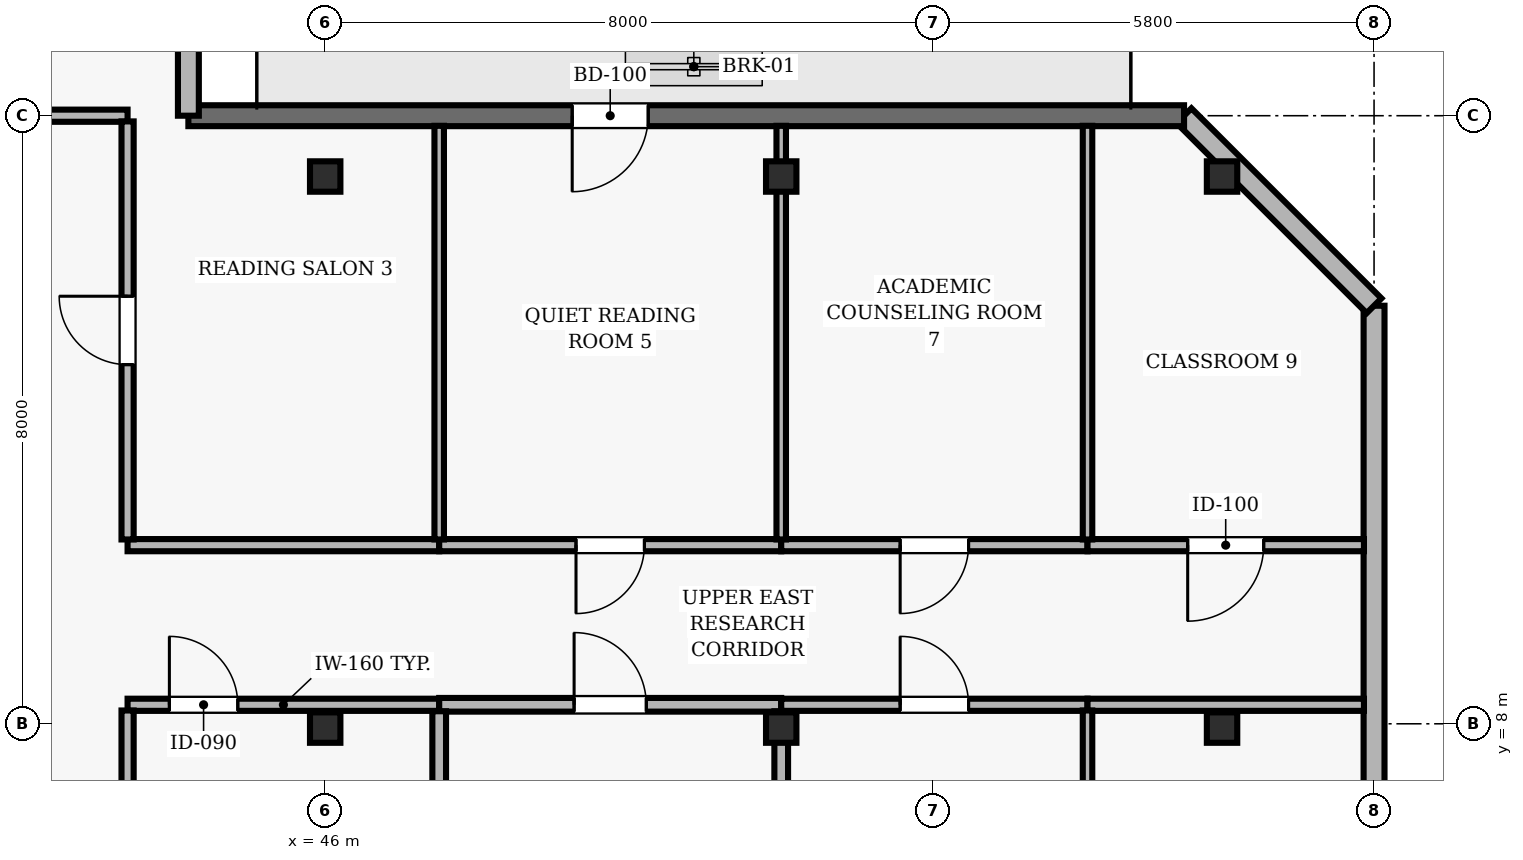
"""IFC4 building model, lengths in metres.
Left out: names, types, materials, properties, quantities, classifications, styles, units other than length and angle.
Written with IfcOpenShell. Run it as: python <this file> out.ifc"""

import sys

from ifc_helpers import new_model, si_unit, direction, frame, frame_2d, origin, origin_2d, place, context, subcontext, project, spatial, rectangle, hollow_rectangle, extrude, element, fill, save


model = new_model("IFC4")
c1 = context("Model", 3, precision=1e-05, world=origin(), true_north=direction((0.0, 1.0)))
c2 = subcontext(c1, "Body", "Model", "MODEL_VIEW")
j1 = project(units=[si_unit("LENGTHUNIT", "METRE"), si_unit("PLANEANGLEUNIT", "RADIAN")], contexts=[c1])
p1 = place(None, origin())
s1 = spatial("IfcSite", under=j1, at=p1, CompositionType="ELEMENT")
p2 = place(p1, origin())
s2 = spatial("IfcBuilding", under=s1, at=p2, CompositionType="ELEMENT")
p3 = place(p2, frame((0.0, 0.0, 275.5)))
s3 = spatial("IfcBuildingStorey", under=s2, at=p3, CompositionType="ELEMENT", Elevation=275.5)
for number, where, z_axis, x_axis in (
    (1, (46.0, 7.95, 0.0), (0.0, 0.0, 1.0), (1.0, 0.0, 0.0)),
    (2, (46.0, 15.2, 0.0), (0.0, 0.0, 1.0), (1.0, 0.0, 0.0)),
    (3, (52.0, 7.95, 0.0), (0.0, 0.0, 1.0), (1.0, 0.0, 0.0)),
    (4, (52.0, 15.2, 0.0), (0.0, 0.0, 1.0), (1.0, 0.0, 0.0)),
    (5, (57.8, 7.95, 0.0), (0.0, 0.0, 1.0), (1.0, 0.0, 0.0)),
    (6, (57.8, 15.2, 0.0), (0.0, 0.0, 1.0), (1.0, 0.0, 0.0)),
):
    element("IfcColumn", number, at=place(p3, frame(where, z_axis=z_axis, x_axis=x_axis)), inside=s3, PredefinedType="COLUMN", context=c2, shape_type="SweptSolid", body=[
        extrude(hollow_rectangle(XDim=0.4, YDim=0.4, WallThickness=0.02, at=origin_2d()), origin(), (0.0, 0.0, 1.0), 3.9),
    ])
p4 = place(p3, frame((59.8, 2.5, 0.0), z_axis=(0.0, 0.0, 1.0), x_axis=(0.0, 1.0, 0.0)))
e7 = element("IfcWall", 7, at=p4, inside=s3, PredefinedType="SOLIDWALL", context=c2, shape_type="SweptSolid", body=[
    extrude(rectangle(XDim=11.0, YDim=0.275, at=frame_2d((5.5, 0.0))), origin(), (0.0, 0.0, 1.0), 3.69),
])
p5 = place(p4, frame((1.85, 0.0, 0.9)))
e8 = element("IfcOpeningElement", 8, at=p5, cuts=e7, PredefinedType="OPENING", context=c2, shape_type="SweptSolid", body=[
    extrude(rectangle(XDim=1.8, YDim=2.2, at=frame_2d((0.9, 1.1))), frame((0.0, 0.147, 0.0), z_axis=(0.0, -1.0, 0.0), x_axis=(1.0, 0.0, 0.0)), (0.0, 0.0, 1.0), 0.295),
])
p6 = place(p3, frame((59.8, 13.5, 0.0), z_axis=(0.0, 0.0, 1.0), x_axis=(-0.707106781187, 0.707106781187, 0.0)))
e9 = element("IfcWall", 9, at=p6, inside=s3, PredefinedType="SOLIDWALL", context=c2, shape_type="SweptSolid", body=[
    extrude(rectangle(XDim=3.536, YDim=0.275, at=frame_2d((1.768, 0.0))), origin(), (0.0, 0.0, 1.0), 3.69),
])
p7 = place(p3, frame((57.3, 16.0, 0.0), z_axis=(0.0, 0.0, 1.0), x_axis=(-1.0, 0.0, 0.0)))
e10 = element("IfcWall", 10, at=p7, inside=s3, PredefinedType="SOLIDWALL", context=c2, shape_type="SweptSolid", body=[
    extrude(rectangle(XDim=13.1, YDim=0.275, at=frame_2d((6.55, 0.0))), origin(), (0.0, 0.0, 1.0), 3.69),
])
p8 = place(p7, frame((7.05, 0.0, 0.0)))
e11 = element("IfcOpeningElement", 11, at=p8, cuts=e10, PredefinedType="OPENING", context=c2, shape_type="SweptSolid", body=[
    extrude(rectangle(XDim=1.0, YDim=2.2, at=frame_2d((0.5, 1.1))), frame((0.0, 0.147, 0.0), z_axis=(0.0, -1.0, 0.0), x_axis=(1.0, 0.0, 0.0)), (0.0, 0.0, 1.0), 0.295),
])
p9 = place(p3, frame((44.2, 16.0, 0.0), z_axis=(0.0, 0.0, 1.0), x_axis=(0.0, 1.0, 0.0)))
e12 = element("IfcWall", 12, at=p9, inside=s3, PredefinedType="SOLIDWALL", context=c2, shape_type="SweptSolid", body=[
    extrude(rectangle(XDim=5.4, YDim=0.275, at=frame_2d((2.7, 0.0))), origin(), (0.0, 0.0, 1.0), 3.69),
])
p10 = place(p9, frame((2.1, 0.0, 0.9)))
e13 = element("IfcOpeningElement", 13, at=p10, cuts=e12, PredefinedType="OPENING", context=c2, shape_type="SweptSolid", body=[
    extrude(rectangle(XDim=1.2, YDim=1.6, at=frame_2d((0.6, 0.8))), frame((0.0, 0.147, 0.0), z_axis=(0.0, -1.0, 0.0), x_axis=(1.0, 0.0, 0.0)), (0.0, 0.0, 1.0), 0.295),
])
p11 = place(p3, frame((43.4, 8.25, 0.0), z_axis=(0.0, 0.0, 1.0), x_axis=(1.0, 0.0, 0.0)))
e14 = element("IfcWall", 14, at=p11, inside=s3, PredefinedType="PARTITIONING", context=c2, shape_type="SweptSolid", body=[
    extrude(rectangle(XDim=4.1, YDim=0.16, at=frame_2d((2.05, 0.0))), origin(), (0.0, 0.0, 1.0), 3.227),
])
p12 = place(p11, frame((0.55, 0.0, 0.0)))
e15 = element("IfcOpeningElement", 15, at=p12, cuts=e14, PredefinedType="OPENING", context=c2, shape_type="SweptSolid", body=[
    extrude(rectangle(XDim=0.9, YDim=2.1, at=frame_2d((0.45, 1.05))), frame((0.0, 0.09, 0.0), z_axis=(0.0, -1.0, 0.0), x_axis=(1.0, 0.0, 0.0)), (0.0, 0.0, 1.0), 0.18),
])
p13 = place(p3, frame((43.4, 16.0, 0.0), z_axis=(0.0, 0.0, 1.0), x_axis=(-1.0, 0.0, 0.0)))
e16 = element("IfcWall", 16, at=p13, inside=s3, PredefinedType="PARTITIONING", context=c2, shape_type="SweptSolid", body=[
    extrude(rectangle(XDim=5.35, YDim=0.16, at=frame_2d((2.675, 0.0))), origin(), (0.0, 0.0, 1.0), 3.39),
])
p14 = place(p13, frame((2.225, 0.0, 0.0)))
e17 = element("IfcOpeningElement", 17, at=p14, cuts=e16, PredefinedType="OPENING", context=c2, shape_type="SweptSolid", body=[
    extrude(rectangle(XDim=0.9, YDim=2.1, at=frame_2d((0.45, 1.05))), frame((0.0, 0.09, 0.0), z_axis=(0.0, -1.0, 0.0), x_axis=(1.0, 0.0, 0.0)), (0.0, 0.0, 1.0), 0.18),
])
p15 = place(p3, frame((47.5, 8.25, 0.0), z_axis=(0.0, 0.0, 1.0), x_axis=(1.0, 0.0, 0.0)))
e18 = element("IfcWall", 18, at=p15, inside=s3, PredefinedType="PARTITIONING", context=c2, shape_type="SweptSolid", body=[
    extrude(rectangle(XDim=4.5, YDim=0.18, at=frame_2d((2.25, 0.0))), origin(), (0.0, 0.0, 1.0), 3.227),
])
p16 = place(p15, frame((1.775, 0.0, 0.0)))
e19 = element("IfcOpeningElement", 19, at=p16, cuts=e18, PredefinedType="OPENING", context=c2, shape_type="SweptSolid", body=[
    extrude(rectangle(XDim=0.95, YDim=2.1, at=frame_2d((0.475, 1.05))), frame((0.0, 0.1, 0.0), z_axis=(0.0, -1.0, 0.0), x_axis=(1.0, 0.0, 0.0)), (0.0, 0.0, 1.0), 0.2),
])
p17 = place(p3, frame((47.5, 10.35, 0.0), z_axis=(0.0, 0.0, 1.0), x_axis=(-1.0, 0.0, 0.0)))
e20 = element("IfcWall", 20, at=p17, inside=s3, PredefinedType="PARTITIONING", context=c2, shape_type="SweptSolid", body=[
    extrude(rectangle(XDim=4.1, YDim=0.16, at=frame_2d((2.05, 0.0))), origin(), (0.0, 0.0, 1.0), 3.424),
])
p18 = place(p3, frame((52.0, 8.25, 0.0), z_axis=(0.0, 0.0, 1.0), x_axis=(1.0, 0.0, 0.0)))
e21 = element("IfcWall", 21, at=p18, inside=s3, PredefinedType="PARTITIONING", context=c2, shape_type="SweptSolid", body=[
    extrude(rectangle(XDim=4.03, YDim=0.16, at=frame_2d((2.015, 0.0))), origin(), (0.0, 0.0, 1.0), 3.227),
])
p19 = place(p18, frame((1.565, 0.0, 0.0)))
e22 = element("IfcOpeningElement", 22, at=p19, cuts=e21, PredefinedType="OPENING", context=c2, shape_type="SweptSolid", body=[
    extrude(rectangle(XDim=0.9, YDim=2.1, at=frame_2d((0.45, 1.05))), frame((0.0, 0.09, 0.0), z_axis=(0.0, -1.0, 0.0), x_axis=(1.0, 0.0, 0.0)), (0.0, 0.0, 1.0), 0.18),
])
p20 = place(p3, frame((52.0, 10.35, 0.0), z_axis=(0.0, 0.0, 1.0), x_axis=(-1.0, 0.0, 0.0)))
e23 = element("IfcWall", 23, at=p20, inside=s3, PredefinedType="PARTITIONING", context=c2, shape_type="SweptSolid", body=[
    extrude(rectangle(XDim=4.5, YDim=0.16, at=frame_2d((2.25, 0.0))), origin(), (0.0, 0.0, 1.0), 3.424),
])
p21 = place(p20, frame((1.8, 0.0, 0.0)))
e24 = element("IfcOpeningElement", 24, at=p21, cuts=e23, PredefinedType="OPENING", context=c2, shape_type="SweptSolid", body=[
    extrude(rectangle(XDim=0.9, YDim=2.1, at=frame_2d((0.45, 1.05))), frame((0.0, 0.09, 0.0), z_axis=(0.0, -1.0, 0.0), x_axis=(1.0, 0.0, 0.0)), (0.0, 0.0, 1.0), 0.18),
])
p22 = place(p3, frame((56.03, 8.25, 0.0), z_axis=(0.0, 0.0, 1.0), x_axis=(1.0, 0.0, 0.0)))
e25 = element("IfcWall", 25, at=p22, inside=s3, PredefinedType="PARTITIONING", context=c2, shape_type="SweptSolid", body=[
    extrude(rectangle(XDim=3.637, YDim=0.16, at=frame_2d((1.818, 0.0))), origin(), (0.0, 0.0, 1.0), 3.227),
])
p23 = place(p3, frame((56.03, 10.35, 0.0), z_axis=(0.0, 0.0, 1.0), x_axis=(-1.0, 0.0, 0.0)))
e26 = element("IfcWall", 26, at=p23, inside=s3, PredefinedType="PARTITIONING", context=c2, shape_type="SweptSolid", body=[
    extrude(rectangle(XDim=4.03, YDim=0.16, at=frame_2d((2.015, 0.0))), origin(), (0.0, 0.0, 1.0), 3.424),
])
p24 = place(p23, frame((1.565, 0.0, 0.0)))
e27 = element("IfcOpeningElement", 27, at=p24, cuts=e26, PredefinedType="OPENING", context=c2, shape_type="SweptSolid", body=[
    extrude(rectangle(XDim=0.9, YDim=2.1, at=frame_2d((0.45, 1.05))), frame((0.0, 0.09, 0.0), z_axis=(0.0, -1.0, 0.0), x_axis=(1.0, 0.0, 0.0)), (0.0, 0.0, 1.0), 0.18),
])
p25 = place(p3, frame((59.667, 10.35, 0.0), z_axis=(0.0, 0.0, 1.0), x_axis=(-1.0, 0.0, 0.0)))
e28 = element("IfcWall", 28, at=p25, inside=s3, PredefinedType="PARTITIONING", context=c2, shape_type="SweptSolid", body=[
    extrude(rectangle(XDim=3.637, YDim=0.16, at=frame_2d((1.818, 0.0))), origin(), (0.0, 0.0, 1.0), 3.424),
])
p26 = place(p25, frame((1.319, 0.0, 0.0)))
e29 = element("IfcOpeningElement", 29, at=p26, cuts=e28, PredefinedType="OPENING", context=c2, shape_type="SweptSolid", body=[
    extrude(rectangle(XDim=1.0, YDim=2.1, at=frame_2d((0.5, 1.05))), frame((0.0, 0.09, 0.0), z_axis=(0.0, -1.0, 0.0), x_axis=(1.0, 0.0, 0.0)), (0.0, 0.0, 1.0), 0.18),
])
p27 = place(p3, frame((43.4, 7.135, 0.0), z_axis=(0.0, 0.0, 1.0), x_axis=(0.0, 1.0, 0.0)))
e30 = element("IfcWall", 30, at=p27, inside=s3, PredefinedType="PARTITIONING", context=c2, shape_type="SweptSolid", body=[
    extrude(rectangle(XDim=1.04, YDim=0.16, at=frame_2d((0.52, 0.0))), origin(), (0.0, 0.0, 1.0), 3.69),
])
p28 = place(p3, frame((43.4, 10.425, 0.0), z_axis=(0.0, 0.0, 1.0), x_axis=(0.0, 1.0, 0.0)))
e31 = element("IfcWall", 31, at=p28, inside=s3, PredefinedType="PARTITIONING", context=c2, shape_type="SweptSolid", body=[
    extrude(rectangle(XDim=5.5, YDim=0.16, at=frame_2d((2.75, 0.0))), origin(), (0.0, 0.0, 1.0), 3.69),
])
p29 = place(p28, frame((2.3, 0.0, 0.0)))
e32 = element("IfcOpeningElement", 32, at=p29, cuts=e31, PredefinedType="OPENING", context=c2, shape_type="SweptSolid", body=[
    extrude(rectangle(XDim=0.9, YDim=2.1, at=frame_2d((0.45, 1.05))), frame((0.0, 0.09, 0.0), z_axis=(0.0, -1.0, 0.0), x_axis=(1.0, 0.0, 0.0)), (0.0, 0.0, 1.0), 0.18),
])
p30 = place(p3, frame((47.5, 0.133, 0.0), z_axis=(0.0, 0.0, 1.0), x_axis=(0.0, 1.0, 0.0)))
e33 = element("IfcWall", 33, at=p30, inside=s3, PredefinedType="PARTITIONING", context=c2, shape_type="SweptSolid", body=[
    extrude(rectangle(XDim=8.032, YDim=0.18, at=frame_2d((4.016, 0.0))), origin(), (0.0, 0.0, 1.0), 3.69),
])
p31 = place(p3, frame((47.5, 10.425, 0.0), z_axis=(0.0, 0.0, 1.0), x_axis=(0.0, 1.0, 0.0)))
e34 = element("IfcWall", 34, at=p31, inside=s3, PredefinedType="PARTITIONING", context=c2, shape_type="SweptSolid", body=[
    extrude(rectangle(XDim=5.442, YDim=0.125, at=frame_2d((2.721, 0.0))), origin(), (0.0, 0.0, 1.0), 3.69),
])
p32 = place(p3, frame((52.0, 0.133, 0.0), z_axis=(0.0, 0.0, 1.0), x_axis=(0.0, 1.0, 0.0)))
e35 = element("IfcWall", 35, at=p32, inside=s3, PredefinedType="PARTITIONING", context=c2, shape_type="SweptSolid", body=[
    extrude(rectangle(XDim=8.032, YDim=0.18, at=frame_2d((4.016, 0.0))), origin(), (0.0, 0.0, 1.0), 3.227),
])
p33 = place(p3, frame((52.0, 10.425, 0.0), z_axis=(0.0, 0.0, 1.0), x_axis=(0.0, 1.0, 0.0)))
e36 = element("IfcWall", 36, at=p33, inside=s3, PredefinedType="PARTITIONING", context=c2, shape_type="SweptSolid", body=[
    extrude(rectangle(XDim=5.442, YDim=0.125, at=frame_2d((2.721, 0.0))), origin(), (0.0, 0.0, 1.0), 3.227),
])
p34 = place(p3, frame((56.03, 0.133, 0.0), z_axis=(0.0, 0.0, 1.0), x_axis=(0.0, 1.0, 0.0)))
e37 = element("IfcWall", 37, at=p34, inside=s3, PredefinedType="PARTITIONING", context=c2, shape_type="SweptSolid", body=[
    extrude(rectangle(XDim=8.042, YDim=0.125, at=frame_2d((4.021, 0.0))), origin(), (0.0, 0.0, 1.0), 3.69),
])
p35 = place(p34, frame((3.571, 0.0, 0.0)))
e38 = element("IfcOpeningElement", 38, at=p35, cuts=e37, PredefinedType="OPENING", context=c2, shape_type="SweptSolid", body=[
    extrude(rectangle(XDim=0.9, YDim=2.1, at=frame_2d((0.45, 1.05))), frame((0.0, 0.073, 0.0), z_axis=(0.0, -1.0, 0.0), x_axis=(1.0, 0.0, 0.0)), (0.0, 0.0, 1.0), 0.145),
])
p36 = place(p3, frame((56.03, 10.425, 0.0), z_axis=(0.0, 0.0, 1.0), x_axis=(0.0, 1.0, 0.0)))
e39 = element("IfcWall", 39, at=p36, inside=s3, PredefinedType="PARTITIONING", context=c2, shape_type="SweptSolid", body=[
    extrude(rectangle(XDim=5.442, YDim=0.125, at=frame_2d((2.721, 0.0))), origin(), (0.0, 0.0, 1.0), 3.69),
])
p37 = place(p8, origin())
e40 = element("IfcDoor", 40, at=p37, inside=s3, OperationType="SINGLE_SWING_RIGHT", PredefinedType="DOOR", context=c2, shape_type="SweptSolid", body=[
    extrude(rectangle(XDim=1.0, YDim=2.2, at=frame_2d((0.5, 1.1))), frame((0.0, 0.025, 0.0), z_axis=(0.0, -1.0, 0.0), x_axis=(1.0, 0.0, 0.0)), (0.0, 0.0, 1.0), 0.05),
])
fill(e11, e40)
p38 = place(p12, origin())
e41 = element("IfcDoor", 41, at=p38, inside=s3, OperationType="SINGLE_SWING_LEFT", PredefinedType="DOOR", context=c2, shape_type="SweptSolid", body=[
    extrude(rectangle(XDim=0.9, YDim=2.1, at=frame_2d((0.45, 1.05))), frame((0.0, 0.025, 0.0), z_axis=(0.0, -1.0, 0.0), x_axis=(1.0, 0.0, 0.0)), (0.0, 0.0, 1.0), 0.05),
])
fill(e15, e41)
p39 = place(p29, origin())
e42 = element("IfcDoor", 42, at=p39, inside=s3, OperationType="SINGLE_SWING_RIGHT", PredefinedType="DOOR", context=c2, shape_type="SweptSolid", body=[
    extrude(rectangle(XDim=0.9, YDim=2.1, at=frame_2d((0.45, 1.05))), frame((0.0, 0.025, 0.0), z_axis=(0.0, -1.0, 0.0), x_axis=(1.0, 0.0, 0.0)), (0.0, 0.0, 1.0), 0.05),
])
fill(e32, e42)
p40 = place(p16, origin())
e43 = element("IfcDoor", 43, at=p40, inside=s3, OperationType="SINGLE_SWING_LEFT", PredefinedType="DOOR", context=c2, shape_type="SweptSolid", body=[
    extrude(rectangle(XDim=0.95, YDim=2.1, at=frame_2d((0.475, 1.05))), frame((0.0, 0.025, 0.0), z_axis=(0.0, -1.0, 0.0), x_axis=(1.0, 0.0, 0.0)), (0.0, 0.0, 1.0), 0.05),
])
fill(e19, e43)
p41 = place(p21, origin())
e44 = element("IfcDoor", 44, at=p41, inside=s3, OperationType="SINGLE_SWING_RIGHT", PredefinedType="DOOR", context=c2, shape_type="SweptSolid", body=[
    extrude(rectangle(XDim=0.9, YDim=2.1, at=frame_2d((0.45, 1.05))), frame((0.0, 0.025, 0.0), z_axis=(0.0, -1.0, 0.0), x_axis=(1.0, 0.0, 0.0)), (0.0, 0.0, 1.0), 0.05),
])
fill(e24, e44)
p42 = place(p19, origin())
e45 = element("IfcDoor", 45, at=p42, inside=s3, OperationType="SINGLE_SWING_LEFT", PredefinedType="DOOR", context=c2, shape_type="SweptSolid", body=[
    extrude(rectangle(XDim=0.9, YDim=2.1, at=frame_2d((0.45, 1.05))), frame((0.0, 0.025, 0.0), z_axis=(0.0, -1.0, 0.0), x_axis=(1.0, 0.0, 0.0)), (0.0, 0.0, 1.0), 0.05),
])
fill(e22, e45)
p43 = place(p24, origin())
e46 = element("IfcDoor", 46, at=p43, inside=s3, OperationType="SINGLE_SWING_RIGHT", PredefinedType="DOOR", context=c2, shape_type="SweptSolid", body=[
    extrude(rectangle(XDim=0.9, YDim=2.1, at=frame_2d((0.45, 1.05))), frame((0.0, 0.025, 0.0), z_axis=(0.0, -1.0, 0.0), x_axis=(1.0, 0.0, 0.0)), (0.0, 0.0, 1.0), 0.05),
])
fill(e27, e46)
p44 = place(p26, origin())
e47 = element("IfcDoor", 47, at=p44, inside=s3, OperationType="SINGLE_SWING_RIGHT", PredefinedType="DOOR", context=c2, shape_type="SweptSolid", body=[
    extrude(rectangle(XDim=1.0, YDim=2.1, at=frame_2d((0.5, 1.05))), frame((0.0, 0.025, 0.0), z_axis=(0.0, -1.0, 0.0), x_axis=(1.0, 0.0, 0.0)), (0.0, 0.0, 1.0), 0.05),
])
fill(e29, e47)
save(model, sys.argv[1])
